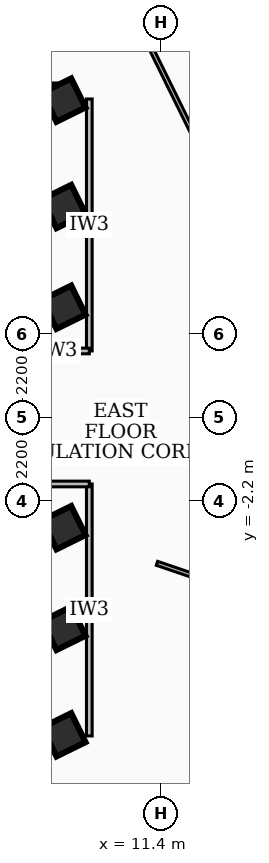
"""IFC4 building model, lengths in metres.
Left out: names, types, materials, properties, quantities, classifications, styles, units other than length and angle.
Written with IfcOpenShell. Run it as: python <this file> out.ifc"""

import sys

from ifc_helpers import new_model, si_unit, direction, frame, frame_2d, origin, origin_2d, place, context, subcontext, project, spatial, rectangle, extrude, element, save


model = new_model("IFC4")
c1 = context("Model", 3, precision=1e-05, world=origin(), true_north=direction((0.0, 1.0)))
c2 = subcontext(c1, "Body", "Model", "MODEL_VIEW")
j1 = project(units=[si_unit("LENGTHUNIT", "METRE"), si_unit("PLANEANGLEUNIT", "RADIAN")], contexts=[c1])
p1 = place(None, origin())
s1 = spatial("IfcSite", under=j1, at=p1, CompositionType="ELEMENT")
p2 = place(p1, origin())
s2 = spatial("IfcBuilding", under=s1, at=p2, CompositionType="ELEMENT")
p3 = place(p2, frame((0.0, 0.0, 192.6)))
s3 = spatial("IfcBuildingStorey", under=s2, at=p3, CompositionType="ELEMENT", Elevation=192.6)
for number, where, z_axis, x_axis in (
    (1, (-8.78, 8.535, 0.0), (0.0, 0.0, 1.0), (1.0, 0.0, 0.0)),
    (2, (8.78, -8.535, 0.0), (0.0, 0.0, 1.0), (-1.0, 0.0, 0.0)),
):
    element("IfcWall", number, at=place(p3, frame(where, z_axis=z_axis, x_axis=x_axis)), inside=s3, PredefinedType="SHEAR", context=c2, shape_type="SweptSolid", body=[
        extrude(rectangle(XDim=17.56, YDim=0.45, at=frame_2d((8.78, 0.0))), origin(), (0.0, 0.0, 1.0), 3.2),
    ])
for number, where, z_axis, x_axis in (
    (3, (8.85, -5.55, 0.0), (0.0, 0.0, 1.0), (0.897, 0.442, 0.0)),
    (4, (8.85, -2.9, 0.0), (0.0, 0.0, 1.0), (0.897, 0.442, 0.0)),
    (5, (8.85, 2.9, 0.0), (0.0, 0.0, 1.0), (0.897, 0.442, 0.0)),
    (6, (8.85, 5.55, 0.0), (0.0, 0.0, 1.0), (0.897, 0.442, 0.0)),
    (7, (8.85, -8.35, 0.0), (0.0, 0.0, 1.0), (0.897, 0.442, 0.0)),
    (8, (8.85, 8.35, 0.0), (0.0, 0.0, 1.0), (0.897, 0.442, 0.0)),
):
    element("IfcColumn", number, at=place(p3, frame(where, z_axis=z_axis, x_axis=x_axis)), inside=s3, PredefinedType="COLUMN", context=c2, shape_type="SweptSolid", body=[
        extrude(rectangle(XDim=0.85, YDim=0.85, at=origin_2d()), origin(), (0.0, 0.0, 1.0), 3.6),
    ])
p4 = place(p3, frame((18.009, -7.222, 0.0), z_axis=(0.0, 0.0, 1.0), x_axis=(-0.896927600032, -0.44217743079, 0.0)))
e9 = element("IfcWall", 9, at=p4, inside=s3, PredefinedType="SOLIDWALL", context=c2, shape_type="SweptSolid", body=[
    extrude(rectangle(XDim=6.758, YDim=0.22, at=frame_2d((3.379, 0.0))), origin(), (0.0, 0.0, 1.0), 3.2),
])
p5 = place(p3, frame((9.52, 1.75, 0.0), z_axis=(0.0, 0.0, 1.0), x_axis=(0.0, 1.0, 0.0)))
e10 = element("IfcWall", 10, at=p5, inside=s3, PredefinedType="PARTITIONING", context=c2, shape_type="SweptSolid", body=[
    extrude(rectangle(XDim=6.63, YDim=0.15, at=frame_2d((3.315, 0.0))), origin(), (0.0, 0.0, 1.0), 2.504),
])
p6 = place(p3, frame((7.85, 1.75, 0.0), z_axis=(0.0, 0.0, 1.0), x_axis=(1.0, 0.0, 0.0)))
e11 = element("IfcWall", 11, at=p6, inside=s3, PredefinedType="PARTITIONING", context=c2, shape_type="SweptSolid", body=[
    extrude(rectangle(XDim=1.67, YDim=0.15, at=frame_2d((0.835, 0.0))), origin(), (0.0, 0.0, 1.0), 2.43),
])
p7 = place(p3, frame((9.52, -8.38, 0.0), z_axis=(0.0, 0.0, 1.0), x_axis=(0.0, 1.0, 0.0)))
e12 = element("IfcWall", 12, at=p7, inside=s3, PredefinedType="PARTITIONING", context=c2, shape_type="SweptSolid", body=[
    extrude(rectangle(XDim=6.63, YDim=0.15, at=frame_2d((3.315, 0.0))), origin(), (0.0, 0.0, 1.0), 3.2),
])
p8 = place(p3, frame((7.85, -1.75, 0.0), z_axis=(0.0, 0.0, 1.0), x_axis=(1.0, 0.0, 0.0)))
e13 = element("IfcWall", 13, at=p8, inside=s3, PredefinedType="PARTITIONING", context=c2, shape_type="SweptSolid", body=[
    extrude(rectangle(XDim=1.67, YDim=0.15, at=frame_2d((0.835, 0.0))), origin(), (0.0, 0.0, 1.0), 2.43),
])
p9 = place(p3, frame((11.3, -3.838, 0.0), z_axis=(0.0, 0.0, 1.0), x_axis=(0.946882857271, -0.321578691158, 0.0)))
e14 = element("IfcWall", 14, at=p9, inside=s3, PredefinedType="PARTITIONING", context=c2, shape_type="SweptSolid", body=[
    extrude(rectangle(XDim=7.74, YDim=0.11, at=frame_2d((3.87, 0.0))), origin(), (0.0, 0.0, 1.0), 3.2),
])
p10 = place(p3, frame((8.122, 15.843, 0.0), z_axis=(0.0, 0.0, 1.0), x_axis=(0.442129285211, -0.896951333774, 0.0)))
e15 = element("IfcWall", 15, at=p10, inside=s3, PredefinedType="PARTITIONING", context=c2, shape_type="SweptSolid", body=[
    extrude(rectangle(XDim=20.639, YDim=0.11, at=frame_2d((10.319, 0.0))), origin(), (0.0, 0.0, 1.0), 2.504),
])
p11 = place(p10, frame((10.02, 0.0, 0.0)))
e16 = element("IfcOpeningElement", 16, at=p11, cuts=e15, PredefinedType="OPENING", context=c2, shape_type="SweptSolid", body=[
    extrude(rectangle(XDim=1.2, YDim=2.1, at=frame_2d((0.6, 1.05))), frame((0.0, 0.065, 0.0), z_axis=(0.0, -1.0, 0.0), x_axis=(1.0, 0.0, 0.0)), (0.0, 0.0, 1.0), 0.13),
])
p12 = place(p3, frame((17.436, 0.997, 0.0), z_axis=(0.0, 0.0, 1.0), x_axis=(-0.442139902385, 0.896946100231, 0.0)))
e17 = element("IfcWall", 17, at=p12, inside=s3, PredefinedType="PARTITIONING", context=c2, shape_type="SweptSolid", body=[
    extrude(rectangle(XDim=13.03, YDim=0.11, at=frame_2d((6.515, 0.0))), origin(), (0.0, 0.0, 1.0), 2.504),
])
p13 = place(p12, frame((5.115, 0.0, 0.0)))
e18 = element("IfcOpeningElement", 18, at=p13, cuts=e17, PredefinedType="OPENING", context=c2, shape_type="SweptSolid", body=[
    extrude(rectangle(XDim=0.86, YDim=2.04, at=frame_2d((0.43, 1.02))), frame((0.0, 0.065, 0.0), z_axis=(0.0, -1.0, 0.0), x_axis=(1.0, 0.0, 0.0)), (0.0, 0.0, 1.0), 0.13),
])
p14 = place(p12, frame((6.555, 0.0, 0.0)))
e19 = element("IfcOpeningElement", 19, at=p14, cuts=e17, PredefinedType="OPENING", context=c2, shape_type="SweptSolid", body=[
    extrude(rectangle(XDim=0.86, YDim=2.04, at=frame_2d((0.43, 1.02))), frame((0.0, 0.065, 0.0), z_axis=(0.0, -1.0, 0.0), x_axis=(1.0, 0.0, 0.0)), (0.0, 0.0, 1.0), 0.13),
])
p15 = place(p3, frame((15.843, -8.122, 0.0), z_axis=(0.0, 0.0, 1.0), x_axis=(-0.896951333774, -0.442129285211, 0.0)))
e20 = element("IfcWall", 20, at=p15, inside=s3, PredefinedType="PARTITIONING", context=c2, shape_type="SweptSolid", body=[
    extrude(rectangle(XDim=20.639, YDim=0.11, at=frame_2d((10.319, 0.0))), origin(), (0.0, 0.0, 1.0), 2.504),
])
p16 = place(p15, frame((10.02, 0.0, 0.0)))
e21 = element("IfcOpeningElement", 21, at=p16, cuts=e20, PredefinedType="OPENING", context=c2, shape_type="SweptSolid", body=[
    extrude(rectangle(XDim=1.2, YDim=2.1, at=frame_2d((0.6, 1.05))), frame((0.0, 0.065, 0.0), z_axis=(0.0, -1.0, 0.0), x_axis=(1.0, 0.0, 0.0)), (0.0, 0.0, 1.0), 0.13),
])
save(model, sys.argv[1])
